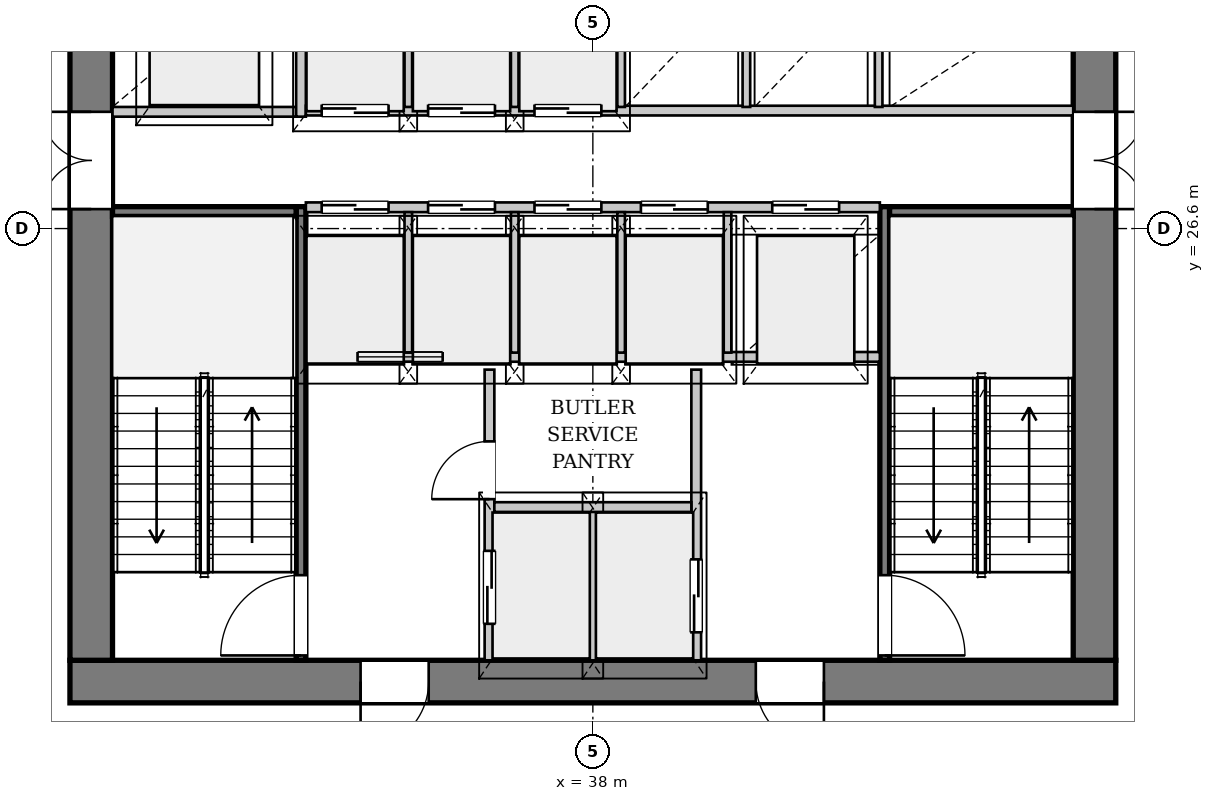
"""IFC4 building model, lengths in metres.
Left out: names, types, materials, properties, quantities, classifications, styles, units other than length and angle.
Written with IfcOpenShell. Run it as: python <this file> out.ifc"""

import sys

from ifc_helpers import new_model, si_unit, direction, frame, frame_2d, origin, place, context, subcontext, project, spatial, rectangle, extrude, source, transform, mapped, element, fill, save


model = new_model("IFC4")
c1 = context("Model", 3, precision=1e-05, world=origin(), true_north=direction((0.0, 1.0)))
c2 = subcontext(c1, "Body", "Model", "MODEL_VIEW")
j1 = project(units=[si_unit("LENGTHUNIT", "METRE"), si_unit("PLANEANGLEUNIT", "RADIAN")], contexts=[c1])
p1 = place(None, origin())
s1 = spatial("IfcSite", under=j1, at=p1, CompositionType="ELEMENT")
p2 = place(p1, origin())
s2 = spatial("IfcBuilding", under=s1, at=p2, CompositionType="ELEMENT")
p3 = place(p2, frame((0.0, 0.0, 138.1)))
s3 = spatial("IfcBuildingStorey", under=s2, at=p3, CompositionType="ELEMENT", Elevation=138.1)
p4 = place(p3, frame((46.6, 19.15, 0.0), z_axis=(0.0, 0.0, 1.0), x_axis=(-1.0, 0.0, 0.0)))
e1 = element("IfcWall", 1, at=p4, inside=s3, PredefinedType="SHEAR", context=c2, shape_type="SweptSolid", body=[
    extrude(rectangle(XDim=17.2, YDim=0.7, at=frame_2d((8.6, 0.0))), origin(), (0.0, 0.0, 1.0), 3.58),
])
p5 = place(p4, frame((4.8, 0.0, 0.0)))
e2 = element("IfcOpeningElement", 2, at=p5, cuts=e1, PredefinedType="OPENING", context=c2, shape_type="SweptSolid", body=[
    extrude(rectangle(XDim=1.12, YDim=2.25, at=frame_2d((0.56, 1.125))), frame((0.0, 0.36, 0.0), z_axis=(0.0, -1.0, 0.0), x_axis=(1.0, 0.0, 0.0)), (0.0, 0.0, 1.0), 0.72),
])
p6 = place(p4, frame((11.3, 0.0, 0.0)))
e3 = element("IfcOpeningElement", 3, at=p6, cuts=e1, PredefinedType="OPENING", context=c2, shape_type="SweptSolid", body=[
    extrude(rectangle(XDim=1.12, YDim=2.25, at=frame_2d((0.56, 1.125))), frame((0.0, 0.36, 0.0), z_axis=(0.0, -1.0, 0.0), x_axis=(1.0, 0.0, 0.0)), (0.0, 0.0, 1.0), 0.72),
])
p7 = place(p3, frame((29.75, 19.5, 0.0), z_axis=(0.0, 0.0, 1.0), x_axis=(0.0, 1.0, 0.0)))
e4 = element("IfcWall", 4, at=p7, inside=s3, PredefinedType="SHEAR", context=c2, shape_type="SweptSolid", body=[
    extrude(rectangle(XDim=14.2, YDim=0.7, at=frame_2d((7.1, 0.0))), origin(), (0.0, 0.0, 1.0), 3.58),
])
p8 = place(p7, frame((7.42, 0.0, 0.0)))
e5 = element("IfcOpeningElement", 5, at=p8, cuts=e4, PredefinedType="OPENING", context=c2, shape_type="SweptSolid", body=[
    extrude(rectangle(XDim=1.6, YDim=2.2, at=frame_2d((0.8, 1.1))), frame((0.0, 0.36, 0.0), z_axis=(0.0, -1.0, 0.0), x_axis=(1.0, 0.0, 0.0)), (0.0, 0.0, 1.0), 0.72),
])
p9 = place(p3, frame((46.25, 33.7, 0.0), z_axis=(0.0, 0.0, 1.0), x_axis=(0.0, -1.0, 0.0)))
e6 = element("IfcWall", 6, at=p9, inside=s3, PredefinedType="SHEAR", context=c2, shape_type="SweptSolid", body=[
    extrude(rectangle(XDim=14.2, YDim=0.7, at=frame_2d((7.1, 0.0))), origin(), (0.0, 0.0, 1.0), 3.58),
])
p10 = place(p9, frame((5.18, 0.0, 0.0)))
e7 = element("IfcOpeningElement", 7, at=p10, cuts=e6, PredefinedType="OPENING", context=c2, shape_type="SweptSolid", body=[
    extrude(rectangle(XDim=1.6, YDim=2.2, at=frame_2d((0.8, 1.1))), frame((0.0, 0.36, 0.0), z_axis=(0.0, -1.0, 0.0), x_axis=(1.0, 0.0, 0.0)), (0.0, 0.0, 1.0), 0.72),
])
p11 = place(p3, frame((33.2, 19.5, 0.0), z_axis=(0.0, 0.0, 1.0), x_axis=(0.0, 1.0, 0.0)))
e8 = element("IfcWall", 8, at=p11, inside=s3, PredefinedType="PARTITIONING", context=c2, shape_type="SweptSolid", body=[
    extrude(rectangle(XDim=7.46, YDim=0.16, at=frame_2d((3.73, 0.0))), origin(), (0.0, 0.0, 1.0), 3.58),
])
p12 = place(p11, frame((0.08, 0.0, 0.0)))
e9 = element("IfcOpeningElement", 9, at=p12, cuts=e8, PredefinedType="OPENING", context=c2, shape_type="SweptSolid", body=[
    extrude(rectangle(XDim=1.32, YDim=2.2, at=frame_2d((0.66, 1.1))), frame((0.0, 0.09, 0.0), z_axis=(0.0, -1.0, 0.0), x_axis=(1.0, 0.0, 0.0)), (0.0, 0.0, 1.0), 0.18),
])
p13 = place(p3, frame((30.1, 26.88, 0.0), z_axis=(0.0, 0.0, 1.0), x_axis=(1.0, 0.0, 0.0)))
e10 = element("IfcWall", 10, at=p13, inside=s3, PredefinedType="PARTITIONING", context=c2, shape_type="SweptSolid", body=[
    extrude(rectangle(XDim=3.02, YDim=0.16, at=frame_2d((1.51, 0.0))), origin(), (0.0, 0.0, 1.0), 3.58),
])
p14 = place(p3, frame((42.8, 26.96, 0.0), z_axis=(0.0, 0.0, 1.0), x_axis=(0.0, -1.0, 0.0)))
e11 = element("IfcWall", 11, at=p14, inside=s3, PredefinedType="PARTITIONING", context=c2, shape_type="SweptSolid", body=[
    extrude(rectangle(XDim=7.46, YDim=0.16, at=frame_2d((3.73, 0.0))), origin(), (0.0, 0.0, 1.0), 3.58),
])
p15 = place(p14, frame((6.06, 0.0, 0.0)))
e12 = element("IfcOpeningElement", 12, at=p15, cuts=e11, PredefinedType="OPENING", context=c2, shape_type="SweptSolid", body=[
    extrude(rectangle(XDim=1.32, YDim=2.2, at=frame_2d((0.66, 1.1))), frame((0.0, 0.09, 0.0), z_axis=(0.0, -1.0, 0.0), x_axis=(1.0, 0.0, 0.0)), (0.0, 0.0, 1.0), 0.18),
])
p16 = place(p3, frame((42.88, 26.88, 0.0), z_axis=(0.0, 0.0, 1.0), x_axis=(1.0, 0.0, 0.0)))
e13 = element("IfcWall", 13, at=p16, inside=s3, PredefinedType="PARTITIONING", context=c2, shape_type="SweptSolid", body=[
    extrude(rectangle(XDim=3.02, YDim=0.16, at=frame_2d((1.51, 0.0))), origin(), (0.0, 0.0, 1.0), 3.58),
])
p17 = place(p3, frame((36.3, 19.5, 0.0), z_axis=(0.0, 0.0, 1.0), x_axis=(0.0, 1.0, 0.0)))
e14 = element("IfcWall", 14, at=p17, inside=s3, PredefinedType="PARTITIONING", context=c2, shape_type="SweptSolid", body=[
    extrude(rectangle(XDim=4.78, YDim=0.16, at=frame_2d((2.39, 0.0))), origin(), (0.0, 0.0, 1.0), 3.58),
])
p18 = place(p17, frame((0.6, 0.0, 0.0)))
e15 = element("IfcOpeningElement", 15, at=p18, cuts=e14, PredefinedType="OPENING", context=c2, shape_type="SweptSolid", body=[
    extrude(rectangle(XDim=1.2, YDim=2.2, at=frame_2d((0.6, 1.1))), frame((0.0, 0.09, 0.0), z_axis=(0.0, -1.0, 0.0), x_axis=(1.0, 0.0, 0.0)), (0.0, 0.0, 1.0), 0.18),
])
p19 = place(p17, frame((2.65, 0.0, 0.0)))
e16 = element("IfcOpeningElement", 16, at=p19, cuts=e14, PredefinedType="OPENING", context=c2, shape_type="SweptSolid", body=[
    extrude(rectangle(XDim=0.95, YDim=2.1, at=frame_2d((0.475, 1.05))), frame((0.0, 0.09, 0.0), z_axis=(0.0, -1.0, 0.0), x_axis=(1.0, 0.0, 0.0)), (0.0, 0.0, 1.0), 0.18),
])
p20 = place(p3, frame((39.7, 24.28, 0.0), z_axis=(0.0, 0.0, 1.0), x_axis=(0.0, -1.0, 0.0)))
e17 = element("IfcWall", 17, at=p20, inside=s3, PredefinedType="PARTITIONING", context=c2, shape_type="SweptSolid", body=[
    extrude(rectangle(XDim=4.78, YDim=0.16, at=frame_2d((2.39, 0.0))), origin(), (0.0, 0.0, 1.0), 3.58),
])
p21 = place(p20, frame((3.12, 0.0, 0.0)))
e18 = element("IfcOpeningElement", 18, at=p21, cuts=e17, PredefinedType="OPENING", context=c2, shape_type="SweptSolid", body=[
    extrude(rectangle(XDim=1.2, YDim=2.2, at=frame_2d((0.6, 1.1))), frame((0.0, 0.09, 0.0), z_axis=(0.0, -1.0, 0.0), x_axis=(1.0, 0.0, 0.0)), (0.0, 0.0, 1.0), 0.18),
])
p22 = place(p3, frame((38.0, 19.5, 0.0), z_axis=(0.0, 0.0, 1.0), x_axis=(0.0, 1.0, 0.0)))
e19 = element("IfcWall", 19, at=p22, inside=s3, PredefinedType="PARTITIONING", context=c2, shape_type="SweptSolid", body=[
    extrude(rectangle(XDim=2.46, YDim=0.125, at=frame_2d((1.23, 0.0))), origin(), (0.0, 0.0, 1.0), 3.58),
])
p23 = place(p3, frame((36.38, 22.02, 0.0), z_axis=(0.0, 0.0, 1.0), x_axis=(1.0, 0.0, 0.0)))
e20 = element("IfcWall", 20, at=p23, inside=s3, PredefinedType="PARTITIONING", context=c2, shape_type="SweptSolid", body=[
    extrude(rectangle(XDim=3.24, YDim=0.16, at=frame_2d((1.62, 0.0))), origin(), (0.0, 0.0, 1.0), 3.58),
])
p24 = place(p3, frame((33.28, 24.49, 0.0), z_axis=(0.0, 0.0, 1.0), x_axis=(1.0, 0.0, 0.0)))
e21 = element("IfcWall", 21, at=p24, inside=s3, PredefinedType="PARTITIONING", context=c2, shape_type="SweptSolid", body=[
    extrude(rectangle(XDim=9.44, YDim=0.16, at=frame_2d((4.72, 0.0))), origin(), (0.0, 0.0, 1.0), 3.58),
])
p25 = place(p24, frame((0.85, 0.0, 0.95)))
e22 = element("IfcOpeningElement", 22, at=p25, cuts=e21, PredefinedType="OPENING", context=c2, shape_type="SweptSolid", body=[
    extrude(rectangle(XDim=1.4, YDim=1.8, at=frame_2d((0.7, 0.9))), frame((0.0, 0.09, 0.0), z_axis=(0.0, -1.0, 0.0), x_axis=(1.0, 0.0, 0.0)), (0.0, 0.0, 1.0), 0.18),
])
p26 = place(p3, frame((30.1, 28.52, 0.0), z_axis=(0.0, 0.0, 1.0), x_axis=(1.0, 0.0, 0.0)))
e23 = element("IfcWall", 23, at=p26, inside=s3, PredefinedType="PARTITIONING", context=c2, shape_type="SweptSolid", body=[
    extrude(rectangle(XDim=3.02, YDim=0.16, at=frame_2d((1.51, 0.0))), origin(), (0.0, 0.0, 1.0), 3.58),
])
p27 = place(p3, frame((33.2, 28.44, 0.0), z_axis=(0.0, 0.0, 1.0), x_axis=(0.0, 1.0, 0.0)))
e24 = element("IfcWall", 24, at=p27, inside=s3, PredefinedType="PARTITIONING", context=c2, shape_type="SweptSolid", body=[
    extrude(rectangle(XDim=5.26, YDim=0.16, at=frame_2d((2.63, 0.0))), origin(), (0.0, 0.0, 1.0), 3.58),
])
p28 = place(p3, frame((33.28, 26.95, 0.0), z_axis=(0.0, 0.0, 1.0), x_axis=(1.0, 0.0, 0.0)))
e25 = element("IfcWall", 25, at=p28, inside=s3, PredefinedType="PARTITIONING", context=c2, shape_type="SweptSolid", body=[
    extrude(rectangle(XDim=9.44, YDim=0.16, at=frame_2d((4.72, 0.0))), origin(), (0.0, 0.0, 1.0), 3.58),
])
p29 = place(p28, frame((0.26, 0.0, 0.0)))
e26 = element("IfcOpeningElement", 26, at=p29, cuts=e25, PredefinedType="OPENING", context=c2, shape_type="SweptSolid", body=[
    extrude(rectangle(XDim=1.1, YDim=2.2, at=frame_2d((0.55, 1.1))), frame((0.0, 0.09, 0.0), z_axis=(0.0, -1.0, 0.0), x_axis=(1.0, 0.0, 0.0)), (0.0, 0.0, 1.0), 0.18),
])
p30 = place(p28, frame((2.01, 0.0, 0.0)))
e27 = element("IfcOpeningElement", 27, at=p30, cuts=e25, PredefinedType="OPENING", context=c2, shape_type="SweptSolid", body=[
    extrude(rectangle(XDim=1.1, YDim=2.2, at=frame_2d((0.55, 1.1))), frame((0.0, 0.09, 0.0), z_axis=(0.0, -1.0, 0.0), x_axis=(1.0, 0.0, 0.0)), (0.0, 0.0, 1.0), 0.18),
])
p31 = place(p28, frame((3.76, 0.0, 0.0)))
e28 = element("IfcOpeningElement", 28, at=p31, cuts=e25, PredefinedType="OPENING", context=c2, shape_type="SweptSolid", body=[
    extrude(rectangle(XDim=1.1, YDim=2.2, at=frame_2d((0.55, 1.1))), frame((0.0, 0.09, 0.0), z_axis=(0.0, -1.0, 0.0), x_axis=(1.0, 0.0, 0.0)), (0.0, 0.0, 1.0), 0.18),
])
p32 = place(p28, frame((5.51, 0.0, 0.0)))
e29 = element("IfcOpeningElement", 29, at=p32, cuts=e25, PredefinedType="OPENING", context=c2, shape_type="SweptSolid", body=[
    extrude(rectangle(XDim=1.1, YDim=2.2, at=frame_2d((0.55, 1.1))), frame((0.0, 0.09, 0.0), z_axis=(0.0, -1.0, 0.0), x_axis=(1.0, 0.0, 0.0)), (0.0, 0.0, 1.0), 0.18),
])
p33 = place(p28, frame((7.67, 0.0, 0.0)))
e30 = element("IfcOpeningElement", 30, at=p33, cuts=e25, PredefinedType="OPENING", context=c2, shape_type="SweptSolid", body=[
    extrude(rectangle(XDim=1.1, YDim=2.2, at=frame_2d((0.55, 1.1))), frame((0.0, 0.09, 0.0), z_axis=(0.0, -1.0, 0.0), x_axis=(1.0, 0.0, 0.0)), (0.0, 0.0, 1.0), 0.18),
])
for number, where, z_axis, x_axis in (
    (31, (34.965, 24.56, 0.0), (0.0, 0.0, 1.0), (0.0, 1.0, 0.0)),
    (32, (36.715, 24.56, 0.0), (0.0, 0.0, 1.0), (0.0, 1.0, 0.0)),
    (33, (38.465, 24.56, 0.0), (0.0, 0.0, 1.0), (0.0, 1.0, 0.0)),
    (34, (40.215, 24.56, 0.0), (0.0, 0.0, 1.0), (0.0, 1.0, 0.0)),
):
    element("IfcWall", number, at=place(p3, frame(where, z_axis=z_axis, x_axis=x_axis)), inside=s3, PredefinedType="PARTITIONING", context=c2, shape_type="SweptSolid", body=[
        extrude(rectangle(XDim=2.31, YDim=0.125, at=frame_2d((1.155, 0.0))), origin(), (0.0, 0.0, 1.0), 3.58),
    ])
p34 = place(p3, frame((33.28, 28.54, 0.0), z_axis=(0.0, 0.0, 1.0), x_axis=(1.0, 0.0, 0.0)))
e35 = element("IfcWall", 35, at=p34, inside=s3, PredefinedType="PARTITIONING", context=c2, shape_type="SweptSolid", body=[
    extrude(rectangle(XDim=12.62, YDim=0.16, at=frame_2d((6.31, 0.0))), origin(), (0.0, 0.0, 1.0), 3.58),
])
p35 = place(p34, frame((0.26, 0.0, 0.0)))
e36 = element("IfcOpeningElement", 36, at=p35, cuts=e35, PredefinedType="OPENING", context=c2, shape_type="SweptSolid", body=[
    extrude(rectangle(XDim=1.1, YDim=2.2, at=frame_2d((0.55, 1.1))), frame((0.0, 0.09, 0.0), z_axis=(0.0, -1.0, 0.0), x_axis=(1.0, 0.0, 0.0)), (0.0, 0.0, 1.0), 0.18),
])
p36 = place(p34, frame((2.01, 0.0, 0.0)))
e37 = element("IfcOpeningElement", 37, at=p36, cuts=e35, PredefinedType="OPENING", context=c2, shape_type="SweptSolid", body=[
    extrude(rectangle(XDim=1.1, YDim=2.2, at=frame_2d((0.55, 1.1))), frame((0.0, 0.09, 0.0), z_axis=(0.0, -1.0, 0.0), x_axis=(1.0, 0.0, 0.0)), (0.0, 0.0, 1.0), 0.18),
])
p37 = place(p34, frame((3.76, 0.0, 0.0)))
e38 = element("IfcOpeningElement", 38, at=p37, cuts=e35, PredefinedType="OPENING", context=c2, shape_type="SweptSolid", body=[
    extrude(rectangle(XDim=1.1, YDim=2.2, at=frame_2d((0.55, 1.1))), frame((0.0, 0.09, 0.0), z_axis=(0.0, -1.0, 0.0), x_axis=(1.0, 0.0, 0.0)), (0.0, 0.0, 1.0), 0.18),
])
for number, where, z_axis, x_axis in (
    (39, (34.965, 28.6, 0.0), (0.0, 0.0, 1.0), (0.0, 1.0, 0.0)),
    (40, (36.715, 28.6, 0.0), (0.0, 0.0, 1.0), (0.0, 1.0, 0.0)),
    (41, (38.465, 28.6, 0.0), (0.0, 0.0, 1.0), (0.0, 1.0, 0.0)),
    (42, (40.525, 28.6, 0.0), (0.0, 0.0, 1.0), (0.0, 1.0, 0.0)),
    (43, (42.7, 28.6, 0.0), (0.0, 0.0, 1.0), (0.0, 1.0, 0.0)),
):
    element("IfcWall", number, at=place(p3, frame(where, z_axis=z_axis, x_axis=x_axis)), inside=s3, PredefinedType="PARTITIONING", context=c2, shape_type="SweptSolid", body=[
        extrude(rectangle(XDim=1.92, YDim=0.125, at=frame_2d((0.96, 0.0))), origin(), (0.0, 0.0, 1.0), 3.58),
    ])
m1 = source(origin(), c2, "Body", "SweptSolid", [
    extrude(rectangle(XDim=1.12, YDim=2.25, at=frame_2d((0.56, 1.125))), frame((0.0, 0.025, 0.0), z_axis=(0.0, -1.0, 0.0), x_axis=(1.0, 0.0, 0.0)), (0.0, 0.0, 1.0), 0.05),
])
p38 = place(p5, origin())
e44 = element("IfcDoor", 44, at=p38, inside=s3, OperationType="SINGLE_SWING_LEFT", PredefinedType="DOOR", context=c2, shape_type="MappedRepresentation", body=[
    mapped(m1, transform((0.0, 0.0, 0.0), x_axis=(1.0, 0.0, 0.0), y_axis=(0.0, 1.0, 0.0), z_axis=(0.0, 0.0, 1.0), scale=1.0)),
])
fill(e2, e44)
p39 = place(p6, origin())
e45 = element("IfcDoor", 45, at=p39, inside=s3, OperationType="SINGLE_SWING_RIGHT", PredefinedType="DOOR", context=c2, shape_type="MappedRepresentation", body=[
    mapped(m1, transform((0.0, 0.0, 0.0), x_axis=(1.0, 0.0, 0.0), y_axis=(0.0, 1.0, 0.0), z_axis=(0.0, 0.0, 1.0), scale=1.0)),
])
fill(e3, e45)
m2 = source(origin(), c2, "Body", "SweptSolid", [
    extrude(rectangle(XDim=1.6, YDim=2.2, at=frame_2d((0.8, 1.1))), frame((0.0, 0.025, 0.0), z_axis=(0.0, -1.0, 0.0), x_axis=(1.0, 0.0, 0.0)), (0.0, 0.0, 1.0), 0.05),
])
p40 = place(p8, origin())
e46 = element("IfcDoor", 46, at=p40, inside=s3, OperationType="DOUBLE_DOOR_SINGLE_SWING", PredefinedType="DOOR", context=c2, shape_type="MappedRepresentation", body=[
    mapped(m2, transform((0.0, 0.0, 0.0), x_axis=(1.0, 0.0, 0.0), y_axis=(0.0, 1.0, 0.0), z_axis=(0.0, 0.0, 1.0), scale=1.0)),
])
fill(e5, e46)
p41 = place(p10, origin())
e47 = element("IfcDoor", 47, at=p41, inside=s3, OperationType="DOUBLE_DOOR_SINGLE_SWING", PredefinedType="DOOR", context=c2, shape_type="MappedRepresentation", body=[
    mapped(m2, transform((0.0, 0.0, 0.0), x_axis=(1.0, 0.0, 0.0), y_axis=(0.0, 1.0, 0.0), z_axis=(0.0, 0.0, 1.0), scale=1.0)),
])
fill(e7, e47)
m3 = source(origin(), c2, "Body", "SweptSolid", [
    extrude(rectangle(XDim=1.32, YDim=2.2, at=frame_2d((0.66, 1.1))), frame((0.0, 0.025, 0.0), z_axis=(0.0, -1.0, 0.0), x_axis=(1.0, 0.0, 0.0)), (0.0, 0.0, 1.0), 0.05),
])
p42 = place(p12, origin())
e48 = element("IfcDoor", 48, at=p42, inside=s3, OperationType="SINGLE_SWING_LEFT", PredefinedType="DOOR", context=c2, shape_type="MappedRepresentation", body=[
    mapped(m3, transform((0.0, 0.0, 0.0), x_axis=(1.0, 0.0, 0.0), y_axis=(0.0, 1.0, 0.0), z_axis=(0.0, 0.0, 1.0), scale=1.0)),
])
fill(e9, e48)
p43 = place(p15, origin())
e49 = element("IfcDoor", 49, at=p43, inside=s3, OperationType="SINGLE_SWING_RIGHT", PredefinedType="DOOR", context=c2, shape_type="MappedRepresentation", body=[
    mapped(m3, transform((0.0, 0.0, 0.0), x_axis=(1.0, 0.0, 0.0), y_axis=(0.0, 1.0, 0.0), z_axis=(0.0, 0.0, 1.0), scale=1.0)),
])
fill(e12, e49)
m4 = source(origin(), c2, "Body", "SweptSolid", [
    extrude(rectangle(XDim=1.2, YDim=2.2, at=frame_2d((0.6, 1.1))), frame((0.0, 0.025, 0.0), z_axis=(0.0, -1.0, 0.0), x_axis=(1.0, 0.0, 0.0)), (0.0, 0.0, 1.0), 0.05),
])
p44 = place(p18, origin())
e50 = element("IfcDoor", 50, at=p44, inside=s3, OperationType="DOUBLE_DOOR_SLIDING", PredefinedType="DOOR", context=c2, shape_type="MappedRepresentation", body=[
    mapped(m4, transform((0.0, 0.0, 0.0), x_axis=(1.0, 0.0, 0.0), y_axis=(0.0, 1.0, 0.0), z_axis=(0.0, 0.0, 1.0), scale=1.0)),
])
fill(e15, e50)
m5 = source(origin(), c2, "Body", "SweptSolid", [
    extrude(rectangle(XDim=0.95, YDim=2.1, at=frame_2d((0.475, 1.05))), frame((0.0, 0.025, 0.0), z_axis=(0.0, -1.0, 0.0), x_axis=(1.0, 0.0, 0.0)), (0.0, 0.0, 1.0), 0.05),
])
p45 = place(p19, origin())
e51 = element("IfcDoor", 51, at=p45, inside=s3, OperationType="SINGLE_SWING_LEFT", PredefinedType="DOOR", context=c2, shape_type="MappedRepresentation", body=[
    mapped(m5, transform((0.0, 0.0, 0.0), x_axis=(1.0, 0.0, 0.0), y_axis=(0.0, 1.0, 0.0), z_axis=(0.0, 0.0, 1.0), scale=1.0)),
])
fill(e16, e51)
p46 = place(p21, origin())
e52 = element("IfcDoor", 52, at=p46, inside=s3, OperationType="DOUBLE_DOOR_SLIDING", PredefinedType="DOOR", context=c2, shape_type="MappedRepresentation", body=[
    mapped(m4, transform((0.0, 0.0, 0.0), x_axis=(1.0, 0.0, 0.0), y_axis=(0.0, 1.0, 0.0), z_axis=(0.0, 0.0, 1.0), scale=1.0)),
])
fill(e18, e52)
m6 = source(origin(), c2, "Body", "SweptSolid", [
    extrude(rectangle(XDim=1.1, YDim=2.2, at=frame_2d((0.55, 1.1))), frame((0.0, 0.025, 0.0), z_axis=(0.0, -1.0, 0.0), x_axis=(1.0, 0.0, 0.0)), (0.0, 0.0, 1.0), 0.05),
])
p47 = place(p29, origin())
e53 = element("IfcDoor", 53, at=p47, inside=s3, OperationType="DOUBLE_DOOR_SLIDING", PredefinedType="DOOR", context=c2, shape_type="MappedRepresentation", body=[
    mapped(m6, transform((0.0, 0.0, 0.0), x_axis=(1.0, 0.0, 0.0), y_axis=(0.0, 1.0, 0.0), z_axis=(0.0, 0.0, 1.0), scale=1.0)),
])
fill(e26, e53)
p48 = place(p30, origin())
e54 = element("IfcDoor", 54, at=p48, inside=s3, OperationType="DOUBLE_DOOR_SLIDING", PredefinedType="DOOR", context=c2, shape_type="MappedRepresentation", body=[
    mapped(m6, transform((0.0, 0.0, 0.0), x_axis=(1.0, 0.0, 0.0), y_axis=(0.0, 1.0, 0.0), z_axis=(0.0, 0.0, 1.0), scale=1.0)),
])
fill(e27, e54)
p49 = place(p31, origin())
e55 = element("IfcDoor", 55, at=p49, inside=s3, OperationType="DOUBLE_DOOR_SLIDING", PredefinedType="DOOR", context=c2, shape_type="MappedRepresentation", body=[
    mapped(m6, transform((0.0, 0.0, 0.0), x_axis=(1.0, 0.0, 0.0), y_axis=(0.0, 1.0, 0.0), z_axis=(0.0, 0.0, 1.0), scale=1.0)),
])
fill(e28, e55)
p50 = place(p32, origin())
e56 = element("IfcDoor", 56, at=p50, inside=s3, OperationType="DOUBLE_DOOR_SLIDING", PredefinedType="DOOR", context=c2, shape_type="MappedRepresentation", body=[
    mapped(m6, transform((0.0, 0.0, 0.0), x_axis=(1.0, 0.0, 0.0), y_axis=(0.0, 1.0, 0.0), z_axis=(0.0, 0.0, 1.0), scale=1.0)),
])
fill(e29, e56)
p51 = place(p33, origin())
e57 = element("IfcDoor", 57, at=p51, inside=s3, OperationType="DOUBLE_DOOR_SLIDING", PredefinedType="DOOR", context=c2, shape_type="MappedRepresentation", body=[
    mapped(m6, transform((0.0, 0.0, 0.0), x_axis=(1.0, 0.0, 0.0), y_axis=(0.0, 1.0, 0.0), z_axis=(0.0, 0.0, 1.0), scale=1.0)),
])
fill(e30, e57)
p52 = place(p35, origin())
e58 = element("IfcDoor", 58, at=p52, inside=s3, OperationType="DOUBLE_DOOR_SLIDING", PredefinedType="DOOR", context=c2, shape_type="MappedRepresentation", body=[
    mapped(m6, transform((0.0, 0.0, 0.0), x_axis=(1.0, 0.0, 0.0), y_axis=(0.0, 1.0, 0.0), z_axis=(0.0, 0.0, 1.0), scale=1.0)),
])
fill(e36, e58)
p53 = place(p36, origin())
e59 = element("IfcDoor", 59, at=p53, inside=s3, OperationType="DOUBLE_DOOR_SLIDING", PredefinedType="DOOR", context=c2, shape_type="MappedRepresentation", body=[
    mapped(m6, transform((0.0, 0.0, 0.0), x_axis=(1.0, 0.0, 0.0), y_axis=(0.0, 1.0, 0.0), z_axis=(0.0, 0.0, 1.0), scale=1.0)),
])
fill(e37, e59)
p54 = place(p37, origin())
e60 = element("IfcDoor", 60, at=p54, inside=s3, OperationType="DOUBLE_DOOR_SLIDING", PredefinedType="DOOR", context=c2, shape_type="MappedRepresentation", body=[
    mapped(m6, transform((0.0, 0.0, 0.0), x_axis=(1.0, 0.0, 0.0), y_axis=(0.0, 1.0, 0.0), z_axis=(0.0, 0.0, 1.0), scale=1.0)),
])
fill(e38, e60)
m7 = source(origin(), c2, "Body", "SweptSolid", [
    extrude(rectangle(XDim=1.4, YDim=1.8, at=frame_2d((0.7, 0.9))), frame((0.0, 0.03, 0.0), z_axis=(0.0, -1.0, 0.0), x_axis=(1.0, 0.0, 0.0)), (0.0, 0.0, 1.0), 0.06),
])
p55 = place(p25, origin())
e61 = element("IfcWindow", 61, at=p55, inside=s3, PartitioningType="SINGLE_PANEL", PredefinedType="WINDOW", context=c2, shape_type="MappedRepresentation", body=[
    mapped(m7, transform((0.0, 0.0, 0.0), x_axis=(1.0, 0.0, 0.0), y_axis=(0.0, 1.0, 0.0), z_axis=(0.0, 0.0, 1.0), scale=1.0)),
])
fill(e22, e61)
save(model, sys.argv[1])
